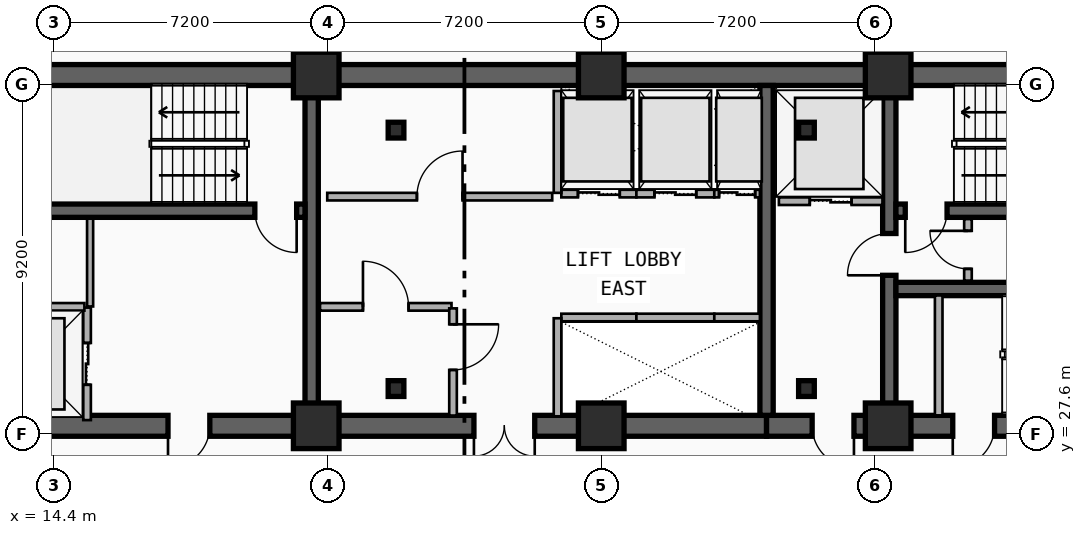
"""IFC4 building model, lengths in metres.
Left out: names, types, materials, properties, quantities, classifications, styles, units other than length and angle.
Written with IfcOpenShell. Run it as: python <this file> out.ifc"""

import sys

from ifc_helpers import new_model, si_unit, direction, frame, frame_2d, origin, origin_2d, place, context, subcontext, project, spatial, rectangle, i_section, extrude, element, fill, save


model = new_model("IFC4")
c1 = context("Model", 3, precision=1e-05, world=origin(), true_north=direction((0.0, 1.0)))
c2 = subcontext(c1, "Body", "Model", "MODEL_VIEW")
j1 = project(units=[si_unit("LENGTHUNIT", "METRE"), si_unit("PLANEANGLEUNIT", "RADIAN")], contexts=[c1])
p1 = place(None, origin())
s1 = spatial("IfcSite", under=j1, at=p1, CompositionType="ELEMENT")
p2 = place(p1, origin())
s2 = spatial("IfcBuilding", under=s1, at=p2, CompositionType="ELEMENT")
p3 = place(p2, frame((0.0, 0.0, 155.45)))
s3 = spatial("IfcBuildingStorey", under=s2, at=p3, CompositionType="ELEMENT", Elevation=155.45)
p4 = place(p3, frame((12.15, 37.05, 0.0), z_axis=(0.0, 0.0, 1.0), x_axis=(1.0, 0.0, 0.0)))
e1 = element("IfcWall", 1, at=p4, inside=s3, PredefinedType="SHEAR", context=c2, shape_type="SweptSolid", body=[
    extrude(rectangle(XDim=33.23, YDim=0.55, at=frame_2d((16.615, 0.0))), origin(), (0.0, 0.0, 1.0), 3.55),
])
p5 = place(p3, frame((21.18, 27.82, 0.0), z_axis=(0.0, 0.0, 1.0), x_axis=(-1.0, 0.0, 0.0)))
e2 = element("IfcWall", 2, at=p5, inside=s3, PredefinedType="SHEAR", context=c2, shape_type="SweptSolid", body=[
    extrude(rectangle(XDim=9.03, YDim=0.55, at=frame_2d((4.515, 0.0))), origin(), (0.0, 0.0, 1.0), 3.55),
])
p6 = place(p5, frame((2.68, 0.0, 0.0)))
e3 = element("IfcOpeningElement", 3, at=p6, cuts=e2, PredefinedType="OPENING", context=c2, shape_type="SweptSolid", body=[
    extrude(rectangle(XDim=1.1, YDim=2.15, at=frame_2d((0.55, 1.075))), frame((0.0, 0.285, 0.0), z_axis=(0.0, -1.0, 0.0), x_axis=(1.0, 0.0, 0.0)), (0.0, 0.0, 1.0), 0.57),
])
p7 = place(p3, frame((33.15, 27.82, 0.0), z_axis=(0.0, 0.0, 1.0), x_axis=(-1.0, 0.0, 0.0)))
e4 = element("IfcWall", 4, at=p7, inside=s3, PredefinedType="SHEAR", context=c2, shape_type="SweptSolid", body=[
    extrude(rectangle(XDim=11.97, YDim=0.55, at=frame_2d((5.985, 0.0))), origin(), (0.0, 0.0, 1.0), 3.55),
])
p8 = place(p7, frame((6.1, 0.0, 0.0)))
e5 = element("IfcOpeningElement", 5, at=p8, cuts=e4, PredefinedType="OPENING", context=c2, shape_type="SweptSolid", body=[
    extrude(rectangle(XDim=1.6, YDim=2.2, at=frame_2d((0.8, 1.1))), frame((0.0, 0.285, 0.0), z_axis=(0.0, -1.0, 0.0), x_axis=(1.0, 0.0, 0.0)), (0.0, 0.0, 1.0), 0.57),
])
p9 = place(p3, frame((45.38, 27.82, 0.0), z_axis=(0.0, 0.0, 1.0), x_axis=(-1.0, 0.0, 0.0)))
e6 = element("IfcWall", 6, at=p9, inside=s3, PredefinedType="SHEAR", context=c2, shape_type="SweptSolid", body=[
    extrude(rectangle(XDim=12.23, YDim=0.55, at=frame_2d((6.115, 0.0))), origin(), (0.0, 0.0, 1.0), 3.55),
])
p10 = place(p9, frame((9.93, 0.0, 0.0)))
e7 = element("IfcOpeningElement", 7, at=p10, cuts=e6, PredefinedType="OPENING", context=c2, shape_type="SweptSolid", body=[
    extrude(rectangle(XDim=1.1, YDim=2.15, at=frame_2d((0.55, 1.075))), frame((0.0, 0.285, 0.0), z_axis=(0.0, -1.0, 0.0), x_axis=(1.0, 0.0, 0.0)), (0.0, 0.0, 1.0), 0.57),
])
p11 = place(p9, frame((6.23, 0.0, 0.0)))
e8 = element("IfcOpeningElement", 8, at=p11, cuts=e6, PredefinedType="OPENING", context=c2, shape_type="SweptSolid", body=[
    extrude(rectangle(XDim=1.1, YDim=2.15, at=frame_2d((0.55, 1.075))), frame((0.0, 0.285, 0.0), z_axis=(0.0, -1.0, 0.0), x_axis=(1.0, 0.0, 0.0)), (0.0, 0.0, 1.0), 0.57),
])
for number, where, z_axis, x_axis in (
    (9, (21.18, 28.095, 0.0), (0.0, 0.0, 1.0), (0.0, 1.0, 0.0)),
    (10, (33.15, 28.095, 0.0), (0.0, 0.0, 1.0), (0.0, 1.0, 0.0)),
):
    element("IfcWall", number, at=place(p3, frame(where, z_axis=z_axis, x_axis=x_axis)), inside=s3, PredefinedType="SHEAR", context=c2, shape_type="SweptSolid", body=[
        extrude(rectangle(XDim=8.68, YDim=0.35, at=frame_2d((4.34, 0.0))), origin(), (0.0, 0.0, 1.0), 3.55),
    ])
p12 = place(p3, frame((36.38, 28.095, 0.0), z_axis=(0.0, 0.0, 1.0), x_axis=(0.0, 1.0, 0.0)))
e11 = element("IfcWall", 11, at=p12, inside=s3, PredefinedType="SHEAR", context=c2, shape_type="SweptSolid", body=[
    extrude(rectangle(XDim=8.68, YDim=0.35, at=frame_2d((4.34, 0.0))), origin(), (0.0, 0.0, 1.0), 3.55),
])
p13 = place(p12, frame((3.685, 0.0, 0.0)))
e12 = element("IfcOpeningElement", 12, at=p13, cuts=e11, PredefinedType="OPENING", context=c2, shape_type="SweptSolid", body=[
    extrude(rectangle(XDim=1.1, YDim=2.15, at=frame_2d((0.55, 1.075))), frame((0.0, 0.185, 0.0), z_axis=(0.0, -1.0, 0.0), x_axis=(1.0, 0.0, 0.0)), (0.0, 0.0, 1.0), 0.37),
])
p14 = place(p3, frame((21.005, 33.48, 0.0), z_axis=(0.0, 0.0, 1.0), x_axis=(-1.0, 0.0, 0.0)))
e13 = element("IfcWall", 13, at=p14, inside=s3, PredefinedType="SHEAR", context=c2, shape_type="SweptSolid", body=[
    extrude(rectangle(XDim=8.58, YDim=0.35, at=frame_2d((4.29, 0.0))), origin(), (0.0, 0.0, 1.0), 3.55),
])
p15 = place(p14, frame((0.22, 0.0, 0.0)))
e14 = element("IfcOpeningElement", 14, at=p15, cuts=e13, PredefinedType="OPENING", context=c2, shape_type="SweptSolid", body=[
    extrude(rectangle(XDim=1.1, YDim=2.15, at=frame_2d((0.55, 1.075))), frame((0.0, 0.185, 0.0), z_axis=(0.0, -1.0, 0.0), x_axis=(1.0, 0.0, 0.0)), (0.0, 0.0, 1.0), 0.37),
])
p16 = place(p3, frame((45.105, 33.48, 0.0), z_axis=(0.0, 0.0, 1.0), x_axis=(-1.0, 0.0, 0.0)))
e15 = element("IfcWall", 15, at=p16, inside=s3, PredefinedType="SHEAR", context=c2, shape_type="SweptSolid", body=[
    extrude(rectangle(XDim=8.55, YDim=0.35, at=frame_2d((4.275, 0.0))), origin(), (0.0, 0.0, 1.0), 3.55),
])
p17 = place(p16, frame((7.205, 0.0, 0.0)))
e16 = element("IfcOpeningElement", 16, at=p17, cuts=e15, PredefinedType="OPENING", context=c2, shape_type="SweptSolid", body=[
    extrude(rectangle(XDim=1.1, YDim=2.15, at=frame_2d((0.55, 1.075))), frame((0.0, 0.185, 0.0), z_axis=(0.0, -1.0, 0.0), x_axis=(1.0, 0.0, 0.0)), (0.0, 0.0, 1.0), 0.37),
])
p18 = place(p3, frame((36.555, 31.42, 0.0), z_axis=(0.0, 0.0, 1.0), x_axis=(1.0, 0.0, 0.0)))
e17 = element("IfcWall", 17, at=p18, inside=s3, PredefinedType="SHEAR", context=c2, shape_type="SweptSolid", body=[
    extrude(rectangle(XDim=8.55, YDim=0.35, at=frame_2d((4.275, 0.0))), origin(), (0.0, 0.0, 1.0), 3.55),
])
for number, where, z_axis, x_axis in (
    (18, (23.4, 28.8, 0.0), (0.0, 0.0, 1.0), (1.0, 0.0, 0.0)),
    (19, (34.2, 28.8, 0.0), (0.0, 0.0, 1.0), (1.0, 0.0, 0.0)),
    (20, (34.2, 35.6, 0.0), (0.0, 0.0, 1.0), (1.0, 0.0, 0.0)),
    (21, (23.4, 35.6, 0.0), (0.0, 0.0, 1.0), (1.0, 0.0, 0.0)),
):
    element("IfcColumn", number, at=place(p3, frame(where, z_axis=z_axis, x_axis=x_axis)), inside=s3, PredefinedType="COLUMN", context=c2, shape_type="SweptSolid", body=[
        extrude(i_section(OverallWidth=0.413, OverallDepth=0.415, WebThickness=0.03, FlangeThickness=0.047, FilletRadius=0.015, at=origin_2d()), origin(), (0.0, 0.0, 1.0), 3.55),
    ])
for number, where, z_axis, x_axis in (
    (22, (21.3, 27.82, 0.0), (0.0, 0.0, 1.0), (1.0, 0.0, 0.0)),
    (23, (21.3, 37.05, 0.0), (0.0, 0.0, 1.0), (1.0, 0.0, 0.0)),
    (24, (28.8, 27.82, 0.0), (0.0, 0.0, 1.0), (1.0, 0.0, 0.0)),
    (25, (28.8, 37.05, 0.0), (0.0, 0.0, 1.0), (1.0, 0.0, 0.0)),
    (26, (36.35, 27.82, 0.0), (0.0, 0.0, 1.0), (1.0, 0.0, 0.0)),
    (27, (36.35, 37.05, 0.0), (0.0, 0.0, 1.0), (1.0, 0.0, 0.0)),
):
    element("IfcColumn", number, at=place(p3, frame(where, z_axis=z_axis, x_axis=x_axis)), inside=s3, PredefinedType="COLUMN", context=c2, shape_type="SweptSolid", body=[
        extrude(rectangle(XDim=1.2, YDim=1.2, at=origin_2d()), origin(), (0.0, 0.0, 1.0), 3.55),
    ])
p19 = place(p3, frame((15.27, 27.97, 0.0), z_axis=(0.0, 0.0, 1.0), x_axis=(0.0, 1.0, 0.0)))
e28 = element("IfcWall", 28, at=p19, inside=s3, PredefinedType="PARTITIONING", context=c2, shape_type="SweptSolid", body=[
    extrude(rectangle(XDim=2.96, YDim=0.2, at=frame_2d((1.48, 0.0))), origin(), (0.0, 0.0, 1.0), 2.36),
])
p20 = place(p19, frame((0.93, 0.0, 0.0)))
e29 = element("IfcOpeningElement", 29, at=p20, cuts=e28, PredefinedType="OPENING", context=c2, shape_type="SweptSolid", body=[
    extrude(rectangle(XDim=1.1, YDim=2.15, at=frame_2d((0.55, 1.075))), frame((0.0, 0.11, 0.0), z_axis=(0.0, -1.0, 0.0), x_axis=(1.0, 0.0, 0.0)), (0.0, 0.0, 1.0), 0.22),
])
p21 = place(p3, frame((12.45, 30.95, 0.0), z_axis=(0.0, 0.0, 1.0), x_axis=(1.0, 0.0, 0.0)))
e30 = element("IfcWall", 30, at=p21, inside=s3, PredefinedType="PARTITIONING", context=c2, shape_type="SweptSolid", body=[
    extrude(rectangle(XDim=2.75, YDim=0.2, at=frame_2d((1.375, 0.0))), origin(), (0.0, 0.0, 1.0), 2.36),
])
p22 = place(p3, frame((33.475, 33.73, 0.0), z_axis=(0.0, 0.0, 1.0), x_axis=(1.0, 0.0, 0.0)))
e31 = element("IfcWall", 31, at=p22, inside=s3, PredefinedType="PARTITIONING", context=c2, shape_type="SweptSolid", body=[
    extrude(rectangle(XDim=2.725, YDim=0.2, at=frame_2d((1.362, 0.0))), origin(), (0.0, 0.0, 1.0), 2.36),
])
p23 = place(p22, frame((0.812, 0.0, 0.0)))
e32 = element("IfcOpeningElement", 32, at=p23, cuts=e31, PredefinedType="OPENING", context=c2, shape_type="SweptSolid", body=[
    extrude(rectangle(XDim=1.1, YDim=2.15, at=frame_2d((0.55, 1.075))), frame((0.0, 0.11, 0.0), z_axis=(0.0, -1.0, 0.0), x_axis=(1.0, 0.0, 0.0)), (0.0, 0.0, 1.0), 0.22),
])
p24 = place(p3, frame((27.75, 30.67, 0.0), z_axis=(0.0, 0.0, 1.0), x_axis=(1.0, 0.0, 0.0)))
e33 = element("IfcWall", 33, at=p24, inside=s3, PredefinedType="PARTITIONING", context=c2, shape_type="SweptSolid", body=[
    extrude(rectangle(XDim=1.975, YDim=0.2, at=frame_2d((0.988, 0.0))), origin(), (0.0, 0.0, 1.0), 2.36),
])
p25 = place(p3, frame((27.65, 28.07, 0.0), z_axis=(0.0, 0.0, 1.0), x_axis=(0.0, 1.0, 0.0)))
e34 = element("IfcWall", 34, at=p25, inside=s3, PredefinedType="PARTITIONING", context=c2, shape_type="SweptSolid", body=[
    extrude(rectangle(XDim=2.58, YDim=0.2, at=frame_2d((1.29, 0.0))), origin(), (0.0, 0.0, 1.0), 2.36),
])
p26 = place(p3, frame((29.725, 30.67, 0.0), z_axis=(0.0, 0.0, 1.0), x_axis=(1.0, 0.0, 0.0)))
e35 = element("IfcWall", 35, at=p26, inside=s3, PredefinedType="PARTITIONING", context=c2, shape_type="SweptSolid", body=[
    extrude(rectangle(XDim=2.05, YDim=0.2, at=frame_2d((1.025, 0.0))), origin(), (0.0, 0.0, 1.0), 2.67),
])
p27 = place(p3, frame((31.775, 30.67, 0.0), z_axis=(0.0, 0.0, 1.0), x_axis=(1.0, 0.0, 0.0)))
e36 = element("IfcWall", 36, at=p27, inside=s3, PredefinedType="PARTITIONING", context=c2, shape_type="SweptSolid", body=[
    extrude(rectangle(XDim=1.2, YDim=0.2, at=frame_2d((0.6, 0.0))), origin(), (0.0, 0.0, 1.0), 2.67),
])
p28 = place(p3, frame((27.75, 33.93, 0.0), z_axis=(0.0, 0.0, 1.0), x_axis=(1.0, 0.0, 0.0)))
e37 = element("IfcWall", 37, at=p28, inside=s3, PredefinedType="PARTITIONING", context=c2, shape_type="SweptSolid", body=[
    extrude(rectangle(XDim=1.975, YDim=0.2, at=frame_2d((0.988, 0.0))), origin(), (0.0, 0.0, 1.0), 2.36),
])
p29 = place(p28, frame((0.438, 0.0, 0.0)))
e38 = element("IfcOpeningElement", 38, at=p29, cuts=e37, PredefinedType="OPENING", context=c2, shape_type="SweptSolid", body=[
    extrude(rectangle(XDim=1.1, YDim=2.15, at=frame_2d((0.55, 1.075))), frame((0.0, 0.11, 0.0), z_axis=(0.0, -1.0, 0.0), x_axis=(1.0, 0.0, 0.0)), (0.0, 0.0, 1.0), 0.22),
])
p30 = place(p3, frame((27.65, 33.95, 0.0), z_axis=(0.0, 0.0, 1.0), x_axis=(0.0, 1.0, 0.0)))
e39 = element("IfcWall", 39, at=p30, inside=s3, PredefinedType="PARTITIONING", context=c2, shape_type="SweptSolid", body=[
    extrude(rectangle(XDim=2.68, YDim=0.2, at=frame_2d((1.34, 0.0))), origin(), (0.0, 0.0, 1.0), 2.36),
])
p31 = place(p3, frame((29.725, 33.93, 0.0), z_axis=(0.0, 0.0, 1.0), x_axis=(1.0, 0.0, 0.0)))
e40 = element("IfcWall", 40, at=p31, inside=s3, PredefinedType="PARTITIONING", context=c2, shape_type="SweptSolid", body=[
    extrude(rectangle(XDim=2.05, YDim=0.2, at=frame_2d((1.025, 0.0))), origin(), (0.0, 0.0, 1.0), 3.29),
])
p32 = place(p31, frame((0.475, 0.0, 0.0)))
e41 = element("IfcOpeningElement", 41, at=p32, cuts=e40, PredefinedType="OPENING", context=c2, shape_type="SweptSolid", body=[
    extrude(rectangle(XDim=1.1, YDim=2.15, at=frame_2d((0.55, 1.075))), frame((0.0, 0.11, 0.0), z_axis=(0.0, -1.0, 0.0), x_axis=(1.0, 0.0, 0.0)), (0.0, 0.0, 1.0), 0.22),
])
p33 = place(p3, frame((31.775, 33.93, 0.0), z_axis=(0.0, 0.0, 1.0), x_axis=(1.0, 0.0, 0.0)))
e42 = element("IfcWall", 42, at=p33, inside=s3, PredefinedType="PARTITIONING", context=c2, shape_type="SweptSolid", body=[
    extrude(rectangle(XDim=1.2, YDim=0.2, at=frame_2d((0.6, 0.0))), origin(), (0.0, 0.0, 1.0), 3.29),
])
p34 = place(p33, frame((0.125, 0.0, 0.0)))
e43 = element("IfcOpeningElement", 43, at=p34, cuts=e42, PredefinedType="OPENING", context=c2, shape_type="SweptSolid", body=[
    extrude(rectangle(XDim=0.95, YDim=2.15, at=frame_2d((0.475, 1.075))), frame((0.0, 0.11, 0.0), z_axis=(0.0, -1.0, 0.0), x_axis=(1.0, 0.0, 0.0)), (0.0, 0.0, 1.0), 0.22),
])
p35 = place(p3, frame((37.68, 28.095, 0.0), z_axis=(0.0, 0.0, 1.0), x_axis=(0.0, 1.0, 0.0)))
e44 = element("IfcWall", 44, at=p35, inside=s3, PredefinedType="PARTITIONING", context=c2, shape_type="SweptSolid", body=[
    extrude(rectangle(XDim=3.155, YDim=0.2, at=frame_2d((1.578, 0.0))), origin(), (0.0, 0.0, 1.0), 2.67),
])
p36 = place(p3, frame((38.45, 31.64, 0.0), z_axis=(0.0, 0.0, 1.0), x_axis=(0.0, 1.0, 0.0)))
e45 = element("IfcWall", 45, at=p36, inside=s3, PredefinedType="PARTITIONING", context=c2, shape_type="SweptSolid", body=[
    extrude(rectangle(XDim=1.62, YDim=0.2, at=frame_2d((0.81, 0.0))), origin(), (0.0, 0.0, 1.0), 3.29),
])
p37 = place(p36, frame((0.31, 0.0, 0.0)))
e46 = element("IfcOpeningElement", 46, at=p37, cuts=e45, PredefinedType="OPENING", context=c2, shape_type="SweptSolid", body=[
    extrude(rectangle(XDim=1.0, YDim=2.15, at=frame_2d((0.5, 1.075))), frame((0.0, 0.11, 0.0), z_axis=(0.0, -1.0, 0.0), x_axis=(1.0, 0.0, 0.0)), (0.0, 0.0, 1.0), 0.22),
])
p38 = place(p3, frame((21.4, 30.95, 0.0), z_axis=(0.0, 0.0, 1.0), x_axis=(1.0, 0.0, 0.0)))
e47 = element("IfcWall", 47, at=p38, inside=s3, PredefinedType="PARTITIONING", context=c2, shape_type="SweptSolid", body=[
    extrude(rectangle(XDim=3.46, YDim=0.2, at=frame_2d((1.73, 0.0))), origin(), (0.0, 0.0, 1.0), 2.36),
])
p39 = place(p38, frame((1.13, 0.0, 0.0)))
e48 = element("IfcOpeningElement", 48, at=p39, cuts=e47, PredefinedType="OPENING", context=c2, shape_type="SweptSolid", body=[
    extrude(rectangle(XDim=1.2, YDim=2.15, at=frame_2d((0.6, 1.075))), frame((0.0, 0.11, 0.0), z_axis=(0.0, -1.0, 0.0), x_axis=(1.0, 0.0, 0.0)), (0.0, 0.0, 1.0), 0.22),
])
p40 = place(p3, frame((21.59, 33.85, 0.0), z_axis=(0.0, 0.0, 1.0), x_axis=(1.0, 0.0, 0.0)))
e49 = element("IfcWall", 49, at=p40, inside=s3, PredefinedType="PARTITIONING", context=c2, shape_type="SweptSolid", body=[
    extrude(rectangle(XDim=5.92, YDim=0.2, at=frame_2d((2.96, 0.0))), origin(), (0.0, 0.0, 1.0), 2.36),
])
p41 = place(p40, frame((2.36, 0.0, 0.0)))
e50 = element("IfcOpeningElement", 50, at=p41, cuts=e49, PredefinedType="OPENING", context=c2, shape_type="SweptSolid", body=[
    extrude(rectangle(XDim=1.2, YDim=2.15, at=frame_2d((0.6, 1.075))), frame((0.0, 0.11, 0.0), z_axis=(0.0, -1.0, 0.0), x_axis=(1.0, 0.0, 0.0)), (0.0, 0.0, 1.0), 0.22),
])
p42 = place(p3, frame((24.9, 30.91, 0.0), z_axis=(0.0, 0.0, 1.0), x_axis=(0.0, -1.0, 0.0)))
e51 = element("IfcWall", 51, at=p42, inside=s3, PredefinedType="PARTITIONING", context=c2, shape_type="SweptSolid", body=[
    extrude(rectangle(XDim=2.82, YDim=0.2, at=frame_2d((1.41, 0.0))), origin(), (0.0, 0.0, 1.0), 2.67),
])
p43 = place(p42, frame((0.419, 0.0, 0.0)))
e52 = element("IfcOpeningElement", 52, at=p43, cuts=e51, PredefinedType="OPENING", context=c2, shape_type="SweptSolid", body=[
    extrude(rectangle(XDim=1.2, YDim=2.15, at=frame_2d((0.6, 1.075))), frame((0.0, 0.11, 0.0), z_axis=(0.0, -1.0, 0.0), x_axis=(1.0, 0.0, 0.0)), (0.0, 0.0, 1.0), 0.22),
])
p44 = place(p3, frame((15.35, 30.96, 0.0), z_axis=(0.0, 0.0, 1.0), x_axis=(0.0, 1.0, 0.0)))
e53 = element("IfcWall", 53, at=p44, inside=s3, PredefinedType="PARTITIONING", context=c2, shape_type="SweptSolid", body=[
    extrude(rectangle(XDim=2.31, YDim=0.16, at=frame_2d((1.155, 0.0))), origin(), (0.0, 0.0, 1.0), 3.29),
])
p45 = place(p20, origin())
e54 = element("IfcDoor", 54, at=p45, inside=s3, OperationType="DOUBLE_DOOR_SLIDING", PredefinedType="DOOR", context=c2, shape_type="SweptSolid", body=[
    extrude(rectangle(XDim=1.1, YDim=2.15, at=frame_2d((0.55, 1.075))), frame((0.0, 0.025, 0.0), z_axis=(0.0, -1.0, 0.0), x_axis=(1.0, 0.0, 0.0)), (0.0, 0.0, 1.0), 0.05),
])
fill(e29, e54)
p46 = place(p23, origin())
e55 = element("IfcDoor", 55, at=p46, inside=s3, OperationType="DOUBLE_DOOR_SLIDING", PredefinedType="DOOR", context=c2, shape_type="SweptSolid", body=[
    extrude(rectangle(XDim=1.1, YDim=2.15, at=frame_2d((0.55, 1.075))), frame((0.0, 0.025, 0.0), z_axis=(0.0, -1.0, 0.0), x_axis=(1.0, 0.0, 0.0)), (0.0, 0.0, 1.0), 0.05),
])
fill(e32, e55)
p47 = place(p29, origin())
e56 = element("IfcDoor", 56, at=p47, inside=s3, OperationType="DOUBLE_DOOR_SLIDING", PredefinedType="DOOR", context=c2, shape_type="SweptSolid", body=[
    extrude(rectangle(XDim=1.1, YDim=2.15, at=frame_2d((0.55, 1.075))), frame((0.0, 0.025, 0.0), z_axis=(0.0, -1.0, 0.0), x_axis=(1.0, 0.0, 0.0)), (0.0, 0.0, 1.0), 0.05),
])
fill(e38, e56)
p48 = place(p32, origin())
e57 = element("IfcDoor", 57, at=p48, inside=s3, OperationType="DOUBLE_DOOR_SLIDING", PredefinedType="DOOR", context=c2, shape_type="SweptSolid", body=[
    extrude(rectangle(XDim=1.1, YDim=2.15, at=frame_2d((0.55, 1.075))), frame((0.0, 0.025, 0.0), z_axis=(0.0, -1.0, 0.0), x_axis=(1.0, 0.0, 0.0)), (0.0, 0.0, 1.0), 0.05),
])
fill(e41, e57)
p49 = place(p34, origin())
e58 = element("IfcDoor", 58, at=p49, inside=s3, OperationType="DOUBLE_DOOR_SLIDING", PredefinedType="DOOR", context=c2, shape_type="SweptSolid", body=[
    extrude(rectangle(XDim=0.95, YDim=2.15, at=frame_2d((0.475, 1.075))), frame((0.0, 0.025, 0.0), z_axis=(0.0, -1.0, 0.0), x_axis=(1.0, 0.0, 0.0)), (0.0, 0.0, 1.0), 0.05),
])
fill(e43, e58)
p50 = place(p15, origin())
e59 = element("IfcDoor", 59, at=p50, inside=s3, OperationType="SINGLE_SWING_LEFT", PredefinedType="DOOR", context=c2, shape_type="SweptSolid", body=[
    extrude(rectangle(XDim=1.1, YDim=2.15, at=frame_2d((0.55, 1.075))), frame((0.0, 0.025, 0.0), z_axis=(0.0, -1.0, 0.0), x_axis=(1.0, 0.0, 0.0)), (0.0, 0.0, 1.0), 0.05),
])
fill(e14, e59)
p51 = place(p6, origin())
e60 = element("IfcDoor", 60, at=p51, inside=s3, OperationType="SINGLE_SWING_RIGHT", PredefinedType="DOOR", context=c2, shape_type="SweptSolid", body=[
    extrude(rectangle(XDim=1.1, YDim=2.15, at=frame_2d((0.55, 1.075))), frame((0.0, 0.025, 0.0), z_axis=(0.0, -1.0, 0.0), x_axis=(1.0, 0.0, 0.0)), (0.0, 0.0, 1.0), 0.05),
])
fill(e3, e60)
p52 = place(p17, origin())
e61 = element("IfcDoor", 61, at=p52, inside=s3, OperationType="SINGLE_SWING_RIGHT", PredefinedType="DOOR", context=c2, shape_type="SweptSolid", body=[
    extrude(rectangle(XDim=1.1, YDim=2.15, at=frame_2d((0.55, 1.075))), frame((0.0, 0.025, 0.0), z_axis=(0.0, -1.0, 0.0), x_axis=(1.0, 0.0, 0.0)), (0.0, 0.0, 1.0), 0.05),
])
fill(e16, e61)
p53 = place(p13, origin())
e62 = element("IfcDoor", 62, at=p53, inside=s3, OperationType="SINGLE_SWING_LEFT", PredefinedType="DOOR", context=c2, shape_type="SweptSolid", body=[
    extrude(rectangle(XDim=1.1, YDim=2.15, at=frame_2d((0.55, 1.075))), frame((0.0, 0.025, 0.0), z_axis=(0.0, -1.0, 0.0), x_axis=(1.0, 0.0, 0.0)), (0.0, 0.0, 1.0), 0.05),
])
fill(e12, e62)
p54 = place(p10, origin())
e63 = element("IfcDoor", 63, at=p54, inside=s3, OperationType="SINGLE_SWING_LEFT", PredefinedType="DOOR", context=c2, shape_type="SweptSolid", body=[
    extrude(rectangle(XDim=1.1, YDim=2.15, at=frame_2d((0.55, 1.075))), frame((0.0, 0.025, 0.0), z_axis=(0.0, -1.0, 0.0), x_axis=(1.0, 0.0, 0.0)), (0.0, 0.0, 1.0), 0.05),
])
fill(e7, e63)
p55 = place(p11, origin())
e64 = element("IfcDoor", 64, at=p55, inside=s3, OperationType="SINGLE_SWING_RIGHT", PredefinedType="DOOR", context=c2, shape_type="SweptSolid", body=[
    extrude(rectangle(XDim=1.1, YDim=2.15, at=frame_2d((0.55, 1.075))), frame((0.0, 0.025, 0.0), z_axis=(0.0, -1.0, 0.0), x_axis=(1.0, 0.0, 0.0)), (0.0, 0.0, 1.0), 0.05),
])
fill(e8, e64)
p56 = place(p8, origin())
e65 = element("IfcDoor", 65, at=p56, inside=s3, OperationType="SINGLE_SWING_LEFT", PredefinedType="DOOR", context=c2, shape_type="SweptSolid", body=[
    extrude(rectangle(XDim=1.6, YDim=2.2, at=frame_2d((0.8, 1.1))), frame((0.0, 0.025, 0.0), z_axis=(0.0, -1.0, 0.0), x_axis=(1.0, 0.0, 0.0)), (0.0, 0.0, 1.0), 0.05),
])
fill(e5, e65)
p57 = place(p37, origin())
e66 = element("IfcDoor", 66, at=p57, inside=s3, OperationType="SINGLE_SWING_RIGHT", PredefinedType="DOOR", context=c2, shape_type="SweptSolid", body=[
    extrude(rectangle(XDim=1.0, YDim=2.15, at=frame_2d((0.5, 1.075))), frame((0.0, 0.025, 0.0), z_axis=(0.0, -1.0, 0.0), x_axis=(1.0, 0.0, 0.0)), (0.0, 0.0, 1.0), 0.05),
])
fill(e46, e66)
p58 = place(p39, origin())
e67 = element("IfcDoor", 67, at=p58, inside=s3, OperationType="SINGLE_SWING_LEFT", PredefinedType="DOOR", context=c2, shape_type="SweptSolid", body=[
    extrude(rectangle(XDim=1.2, YDim=2.15, at=frame_2d((0.6, 1.075))), frame((0.0, 0.025, 0.0), z_axis=(0.0, -1.0, 0.0), x_axis=(1.0, 0.0, 0.0)), (0.0, 0.0, 1.0), 0.05),
])
fill(e48, e67)
p59 = place(p41, origin())
e68 = element("IfcDoor", 68, at=p59, inside=s3, OperationType="SINGLE_SWING_RIGHT", PredefinedType="DOOR", context=c2, shape_type="SweptSolid", body=[
    extrude(rectangle(XDim=1.2, YDim=2.15, at=frame_2d((0.6, 1.075))), frame((0.0, 0.025, 0.0), z_axis=(0.0, -1.0, 0.0), x_axis=(1.0, 0.0, 0.0)), (0.0, 0.0, 1.0), 0.05),
])
fill(e50, e68)
p60 = place(p43, origin())
e69 = element("IfcDoor", 69, at=p60, inside=s3, OperationType="SINGLE_SWING_LEFT", PredefinedType="DOOR", context=c2, shape_type="SweptSolid", body=[
    extrude(rectangle(XDim=1.2, YDim=2.15, at=frame_2d((0.6, 1.075))), frame((0.0, 0.025, 0.0), z_axis=(0.0, -1.0, 0.0), x_axis=(1.0, 0.0, 0.0)), (0.0, 0.0, 1.0), 0.05),
])
fill(e52, e69)
save(model, sys.argv[1])
